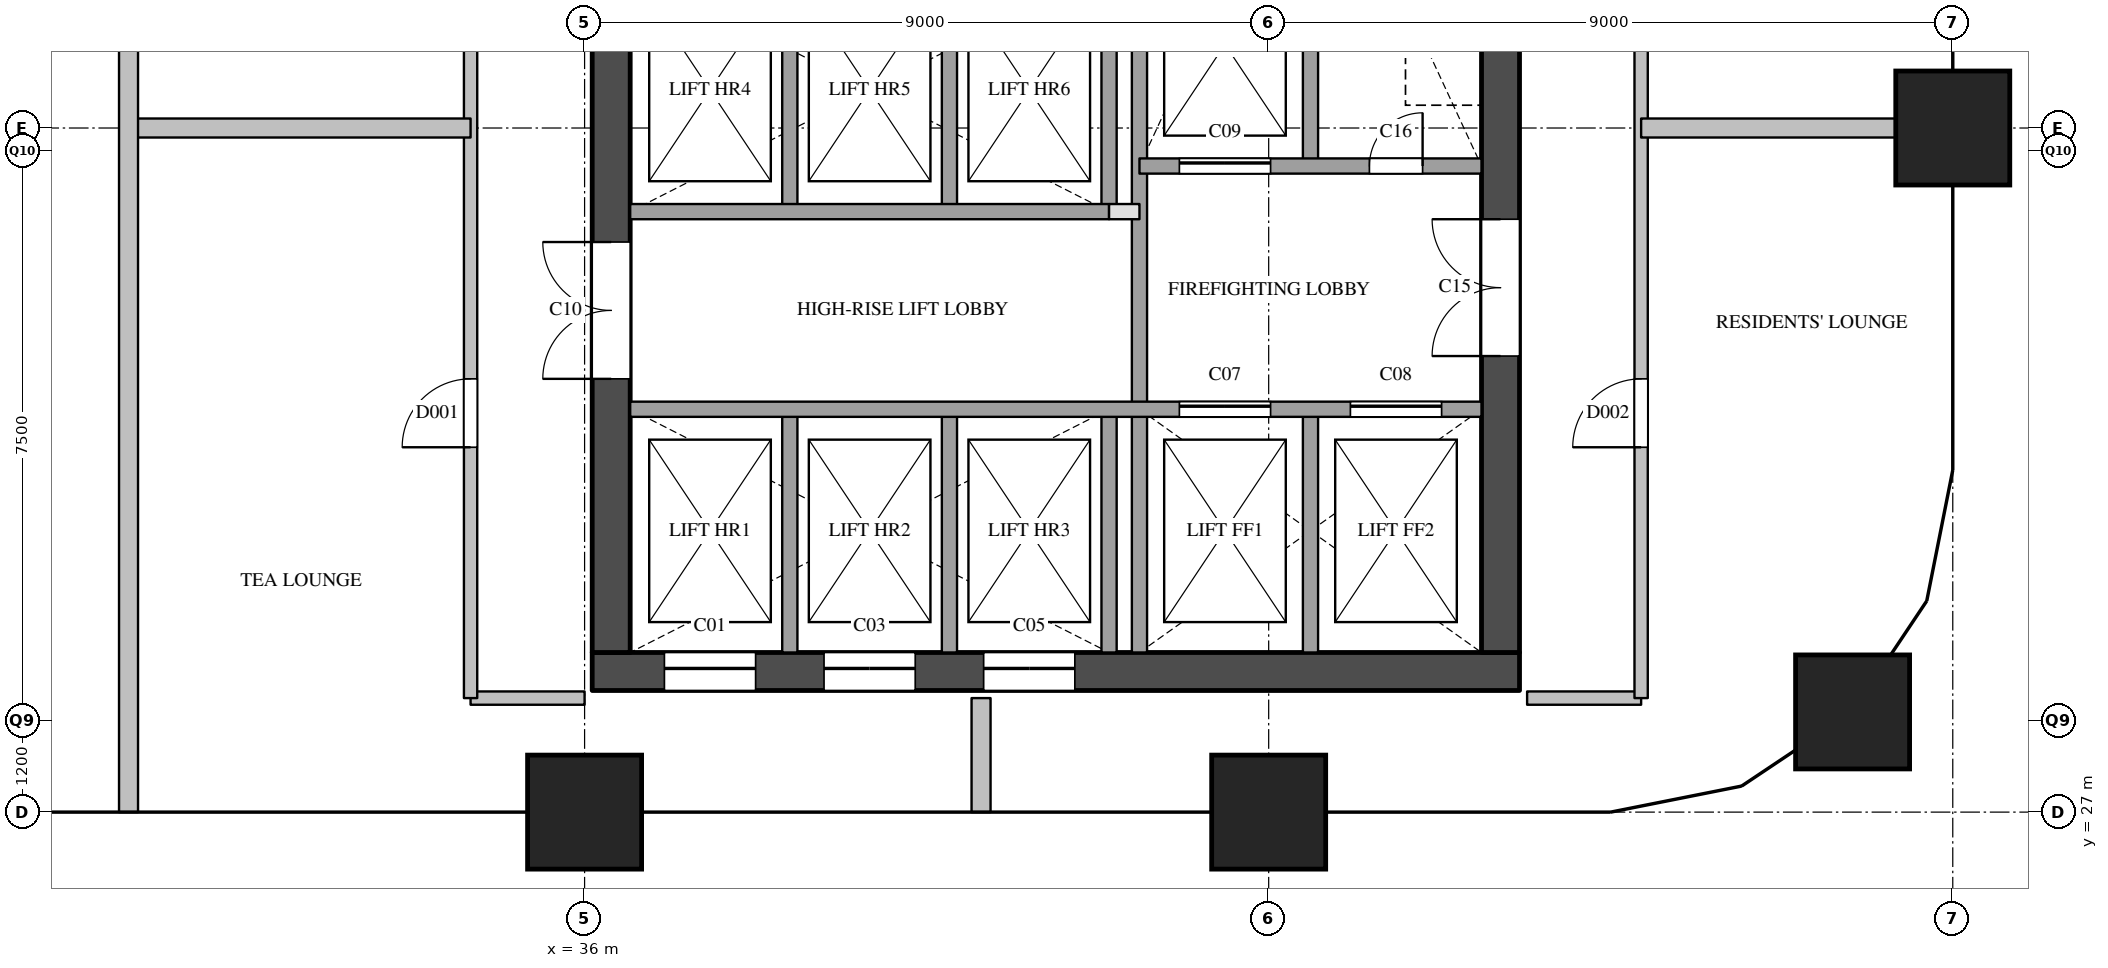
"""IFC4 building model, lengths in metres.
Left out: names, types, materials, properties, quantities, classifications, styles, units other than length and angle.
Written with IfcOpenShell. Run it as: python <this file> out.ifc"""

import sys

from ifc_helpers import new_model, si_unit, direction, frame, frame_2d, origin, origin_2d, place, context, subcontext, project, spatial, rectangle, extrude, element, fill, save


model = new_model("IFC4")
c1 = context("Model", 3, precision=1e-05, world=origin(), true_north=direction((0.0, 1.0)))
c2 = subcontext(c1, "Body", "Model", "MODEL_VIEW")
j1 = project(units=[si_unit("LENGTHUNIT", "METRE"), si_unit("PLANEANGLEUNIT", "RADIAN")], contexts=[c1])
p1 = place(None, origin())
s1 = spatial("IfcSite", under=j1, at=p1, CompositionType="ELEMENT")
p2 = place(p1, origin())
s2 = spatial("IfcBuilding", under=s1, at=p2, CompositionType="ELEMENT")
p3 = place(p2, frame((0.0, 0.0, 154.4)))
s3 = spatial("IfcBuildingStorey", under=s2, at=p3, CompositionType="ELEMENT", Elevation=154.4)
for number, where, z_axis, x_axis in (
    (1, (36.0, 27.0, 0.0), (0.0, 0.0, 1.0), (1.0, 0.0, 0.0)),
    (2, (45.0, 27.0, 0.0), (0.0, 0.0, 1.0), (1.0, 0.0, 0.0)),
    (3, (52.682, 28.318, 0.0), (0.0, 0.0, 1.0), (1.0, 0.0, 0.0)),
    (4, (54.0, 36.0, 0.0), (0.0, 0.0, 1.0), (1.0, 0.0, 0.0)),
):
    element("IfcColumn", number, at=place(p3, frame(where, z_axis=z_axis, x_axis=x_axis)), inside=s3, PredefinedType="COLUMN", context=c2, shape_type="SweptSolid", body=[
        extrude(rectangle(XDim=1.5, YDim=1.5, at=origin_2d()), origin(), (0.0, 0.0, 1.0), 3.9),
    ])
p4 = place(p3, frame((36.1, 28.85, 0.0), z_axis=(0.0, 0.0, 1.0), x_axis=(1.0, 0.0, 0.0)))
e5 = element("IfcWall", 5, at=p4, inside=s3, PredefinedType="SHEAR", context=c2, shape_type="SweptSolid", body=[
    extrude(rectangle(XDim=12.2, YDim=0.5, at=frame_2d((6.1, 0.0))), origin(), (0.0, 0.0, 1.0), 3.6),
])
p5 = place(p4, frame((0.95, 0.0, 0.0)))
e6 = element("IfcOpeningElement", 6, at=p5, cuts=e5, PredefinedType="OPENING", context=c2, shape_type="SweptSolid", body=[
    extrude(rectangle(XDim=1.2, YDim=2.1, at=frame_2d((0.6, 1.05))), frame((0.0, 0.26, 0.0), z_axis=(0.0, -1.0, 0.0), x_axis=(1.0, 0.0, 0.0)), (0.0, 0.0, 1.0), 0.52),
])
p6 = place(p4, frame((3.05, 0.0, 0.0)))
e7 = element("IfcOpeningElement", 7, at=p6, cuts=e5, PredefinedType="OPENING", context=c2, shape_type="SweptSolid", body=[
    extrude(rectangle(XDim=1.2, YDim=2.1, at=frame_2d((0.6, 1.05))), frame((0.0, 0.26, 0.0), z_axis=(0.0, -1.0, 0.0), x_axis=(1.0, 0.0, 0.0)), (0.0, 0.0, 1.0), 0.52),
])
p7 = place(p4, frame((5.15, 0.0, 0.0)))
e8 = element("IfcOpeningElement", 8, at=p7, cuts=e5, PredefinedType="OPENING", context=c2, shape_type="SweptSolid", body=[
    extrude(rectangle(XDim=1.2, YDim=2.1, at=frame_2d((0.6, 1.05))), frame((0.0, 0.26, 0.0), z_axis=(0.0, -1.0, 0.0), x_axis=(1.0, 0.0, 0.0)), (0.0, 0.0, 1.0), 0.52),
])
p8 = place(p3, frame((36.35, 29.1, 0.0), z_axis=(0.0, 0.0, 1.0), x_axis=(0.0, 1.0, 0.0)))
e9 = element("IfcWall", 9, at=p8, inside=s3, PredefinedType="SHEAR", context=c2, shape_type="SweptSolid", body=[
    extrude(rectangle(XDim=20.3, YDim=0.5, at=frame_2d((10.15, 0.0))), origin(), (0.0, 0.0, 1.0), 3.6),
])
p9 = place(p8, frame((3.6, 0.0, 0.0)))
e10 = element("IfcOpeningElement", 10, at=p9, cuts=e9, PredefinedType="OPENING", context=c2, shape_type="SweptSolid", body=[
    extrude(rectangle(XDim=1.8, YDim=2.1, at=frame_2d((0.9, 1.05))), frame((0.0, 0.26, 0.0), z_axis=(0.0, -1.0, 0.0), x_axis=(1.0, 0.0, 0.0)), (0.0, 0.0, 1.0), 0.52),
])
p10 = place(p8, frame((16.4, 0.0, 0.0)))
e11 = element("IfcOpeningElement", 11, at=p10, cuts=e9, PredefinedType="OPENING", context=c2, shape_type="SweptSolid", body=[
    extrude(rectangle(XDim=1.0, YDim=2.1, at=frame_2d((0.5, 1.05))), frame((0.0, 0.26, 0.0), z_axis=(0.0, -1.0, 0.0), x_axis=(1.0, 0.0, 0.0)), (0.0, 0.0, 1.0), 0.52),
])
p11 = place(p3, frame((48.05, 29.1, 0.0), z_axis=(0.0, 0.0, 1.0), x_axis=(0.0, 1.0, 0.0)))
e12 = element("IfcWall", 12, at=p11, inside=s3, PredefinedType="SHEAR", context=c2, shape_type="SweptSolid", body=[
    extrude(rectangle(XDim=20.3, YDim=0.5, at=frame_2d((10.15, 0.0))), origin(), (0.0, 0.0, 1.0), 3.6),
])
p12 = place(p11, frame((12.5, 0.0, 0.0)))
e13 = element("IfcOpeningElement", 13, at=p12, cuts=e12, PredefinedType="OPENING", context=c2, shape_type="SweptSolid", body=[
    extrude(rectangle(XDim=0.7, YDim=2.1, at=frame_2d((0.35, 1.05))), frame((0.0, 0.26, 0.0), z_axis=(0.0, -1.0, 0.0), x_axis=(1.0, 0.0, 0.0)), (0.0, 0.0, 1.0), 0.52),
])
p13 = place(p11, frame((3.9, 0.0, 0.0)))
e14 = element("IfcOpeningElement", 14, at=p13, cuts=e12, PredefinedType="OPENING", context=c2, shape_type="SweptSolid", body=[
    extrude(rectangle(XDim=1.8, YDim=2.1, at=frame_2d((0.9, 1.05))), frame((0.0, 0.26, 0.0), z_axis=(0.0, -1.0, 0.0), x_axis=(1.0, 0.0, 0.0)), (0.0, 0.0, 1.0), 0.52),
])
p14 = place(p3, frame((38.7, 29.1, 0.0), z_axis=(0.0, 0.0, 1.0), x_axis=(0.0, 1.0, 0.0)))
e15 = element("IfcWall", 15, at=p14, inside=s3, PredefinedType="SOLIDWALL", context=c2, shape_type="SweptSolid", body=[
    extrude(rectangle(XDim=3.2, YDim=0.2, at=frame_2d((1.6, 0.0))), origin(), (0.0, 0.0, 1.0), 3.6),
])
p15 = place(p3, frame((38.7, 34.9, 0.0), z_axis=(0.0, 0.0, 1.0), x_axis=(0.0, 1.0, 0.0)))
e16 = element("IfcWall", 16, at=p15, inside=s3, PredefinedType="SOLIDWALL", context=c2, shape_type="SweptSolid", body=[
    extrude(rectangle(XDim=3.2, YDim=0.2, at=frame_2d((1.6, 0.0))), origin(), (0.0, 0.0, 1.0), 3.6),
])
p16 = place(p3, frame((40.8, 29.1, 0.0), z_axis=(0.0, 0.0, 1.0), x_axis=(0.0, 1.0, 0.0)))
e17 = element("IfcWall", 17, at=p16, inside=s3, PredefinedType="SOLIDWALL", context=c2, shape_type="SweptSolid", body=[
    extrude(rectangle(XDim=3.2, YDim=0.2, at=frame_2d((1.6, 0.0))), origin(), (0.0, 0.0, 1.0), 3.6),
])
p17 = place(p3, frame((40.8, 34.9, 0.0), z_axis=(0.0, 0.0, 1.0), x_axis=(0.0, 1.0, 0.0)))
e18 = element("IfcWall", 18, at=p17, inside=s3, PredefinedType="SOLIDWALL", context=c2, shape_type="SweptSolid", body=[
    extrude(rectangle(XDim=3.2, YDim=0.2, at=frame_2d((1.6, 0.0))), origin(), (0.0, 0.0, 1.0), 3.6),
])
p18 = place(p3, frame((42.9, 29.1, 0.0), z_axis=(0.0, 0.0, 1.0), x_axis=(0.0, 1.0, 0.0)))
e19 = element("IfcWall", 19, at=p18, inside=s3, PredefinedType="SOLIDWALL", context=c2, shape_type="SweptSolid", body=[
    extrude(rectangle(XDim=3.2, YDim=0.2, at=frame_2d((1.6, 0.0))), origin(), (0.0, 0.0, 1.0), 3.6),
])
p19 = place(p3, frame((42.9, 34.9, 0.0), z_axis=(0.0, 0.0, 1.0), x_axis=(0.0, 1.0, 0.0)))
e20 = element("IfcWall", 20, at=p19, inside=s3, PredefinedType="SOLIDWALL", context=c2, shape_type="SweptSolid", body=[
    extrude(rectangle(XDim=3.2, YDim=0.2, at=frame_2d((1.6, 0.0))), origin(), (0.0, 0.0, 1.0), 3.6),
])
p20 = place(p3, frame((43.3, 29.1, 0.0), z_axis=(0.0, 0.0, 1.0), x_axis=(0.0, 1.0, 0.0)))
e21 = element("IfcWall", 21, at=p20, inside=s3, PredefinedType="SOLIDWALL", context=c2, shape_type="SweptSolid", body=[
    extrude(rectangle(XDim=9.9, YDim=0.2, at=frame_2d((4.95, 0.0))), origin(), (0.0, 0.0, 1.0), 3.6),
])
for number, where, z_axis, x_axis in (
    (22, (45.55, 29.1, 0.0), (0.0, 0.0, 1.0), (0.0, 1.0, 0.0)),
    (23, (45.55, 35.5, 0.0), (0.0, 0.0, 1.0), (0.0, 1.0, 0.0)),
):
    element("IfcWall", number, at=place(p3, frame(where, z_axis=z_axis, x_axis=x_axis)), inside=s3, PredefinedType="SOLIDWALL", context=c2, shape_type="SweptSolid", body=[
        extrude(rectangle(XDim=3.2, YDim=0.2, at=frame_2d((1.6, 0.0))), origin(), (0.0, 0.0, 1.0), 3.6),
    ])
p21 = place(p3, frame((36.6, 32.3, 0.0), z_axis=(0.0, 0.0, 1.0), x_axis=(1.0, 0.0, 0.0)))
e24 = element("IfcWall", 24, at=p21, inside=s3, PredefinedType="SOLIDWALL", context=c2, shape_type="SweptSolid", body=[
    extrude(rectangle(XDim=11.2, YDim=0.2, at=frame_2d((5.6, 0.0))), origin(), (0.0, 0.0, 1.0), 3.6),
])
p22 = place(p21, frame((7.225, 0.0, 0.0)))
e25 = element("IfcOpeningElement", 25, at=p22, cuts=e24, PredefinedType="OPENING", context=c2, shape_type="SweptSolid", body=[
    extrude(rectangle(XDim=1.2, YDim=2.1, at=frame_2d((0.6, 1.05))), frame((0.0, 0.11, 0.0), z_axis=(0.0, -1.0, 0.0), x_axis=(1.0, 0.0, 0.0)), (0.0, 0.0, 1.0), 0.22),
])
p23 = place(p21, frame((9.475, 0.0, 0.0)))
e26 = element("IfcOpeningElement", 26, at=p23, cuts=e24, PredefinedType="OPENING", context=c2, shape_type="SweptSolid", body=[
    extrude(rectangle(XDim=1.2, YDim=2.1, at=frame_2d((0.6, 1.05))), frame((0.0, 0.11, 0.0), z_axis=(0.0, -1.0, 0.0), x_axis=(1.0, 0.0, 0.0)), (0.0, 0.0, 1.0), 0.22),
])
p24 = place(p3, frame((42.9, 34.9, 0.0), z_axis=(0.0, 0.0, 1.0), x_axis=(1.0, 0.0, 0.0)))
e27 = element("IfcWall", 27, at=p24, inside=s3, PredefinedType="PARTITIONING", context=c2, shape_type="SweptSolid", body=[
    extrude(rectangle(XDim=0.4, YDim=0.2, at=frame_2d((0.2, 0.0))), origin(), (0.0, 0.0, 1.0), 3.6),
])
p25 = place(p3, frame((36.6, 34.9, 0.0), z_axis=(0.0, 0.0, 1.0), x_axis=(1.0, 0.0, 0.0)))
e28 = element("IfcWall", 28, at=p25, inside=s3, PredefinedType="SOLIDWALL", context=c2, shape_type="SweptSolid", body=[
    extrude(rectangle(XDim=6.3, YDim=0.2, at=frame_2d((3.15, 0.0))), origin(), (0.0, 0.0, 1.0), 3.6),
])
p26 = place(p3, frame((43.3, 35.5, 0.0), z_axis=(0.0, 0.0, 1.0), x_axis=(1.0, 0.0, 0.0)))
e29 = element("IfcWall", 29, at=p26, inside=s3, PredefinedType="SOLIDWALL", context=c2, shape_type="SweptSolid", body=[
    extrude(rectangle(XDim=4.5, YDim=0.2, at=frame_2d((2.25, 0.0))), origin(), (0.0, 0.0, 1.0), 3.6),
])
p27 = place(p26, frame((0.525, 0.0, 0.0)))
e30 = element("IfcOpeningElement", 30, at=p27, cuts=e29, PredefinedType="OPENING", context=c2, shape_type="SweptSolid", body=[
    extrude(rectangle(XDim=1.2, YDim=2.1, at=frame_2d((0.6, 1.05))), frame((0.0, 0.11, 0.0), z_axis=(0.0, -1.0, 0.0), x_axis=(1.0, 0.0, 0.0)), (0.0, 0.0, 1.0), 0.22),
])
p28 = place(p26, frame((3.025, 0.0, 0.0)))
e31 = element("IfcOpeningElement", 31, at=p28, cuts=e29, PredefinedType="OPENING", context=c2, shape_type="SweptSolid", body=[
    extrude(rectangle(XDim=0.7, YDim=2.1, at=frame_2d((0.35, 1.05))), frame((0.0, 0.11, 0.0), z_axis=(0.0, -1.0, 0.0), x_axis=(1.0, 0.0, 0.0)), (0.0, 0.0, 1.0), 0.22),
])
for number, where, z_axis, x_axis in (
    (32, (34.5, 28.5, 0.0), (0.0, 0.0, 1.0), (1.0, 0.0, 0.0)),
    (33, (48.4, 28.5, 0.0), (0.0, 0.0, 1.0), (1.0, 0.0, 0.0)),
):
    element("IfcWall", number, at=place(p3, frame(where, z_axis=z_axis, x_axis=x_axis)), inside=s3, PredefinedType="PARTITIONING", context=c2, shape_type="SweptSolid", body=[
        extrude(rectangle(XDim=1.5, YDim=0.175, at=frame_2d((0.75, 0.0))), origin(), (0.0, 0.0, 1.0), 3.6),
    ])
p29 = place(p3, frame((34.5, 28.5, 0.0), z_axis=(0.0, 0.0, 1.0), x_axis=(0.0, 1.0, 0.0)))
e34 = element("IfcWall", 34, at=p29, inside=s3, PredefinedType="PARTITIONING", context=c2, shape_type="SweptSolid", body=[
    extrude(rectangle(XDim=12.75, YDim=0.175, at=frame_2d((6.375, 0.0))), origin(), (0.0, 0.0, 1.0), 3.6),
])
p30 = place(p29, frame((3.3, 0.0, 0.0)))
e35 = element("IfcOpeningElement", 35, at=p30, cuts=e34, PredefinedType="OPENING", context=c2, shape_type="SweptSolid", body=[
    extrude(rectangle(XDim=0.9, YDim=2.1, at=frame_2d((0.45, 1.05))), frame((0.0, 0.097, 0.0), z_axis=(0.0, -1.0, 0.0), x_axis=(1.0, 0.0, 0.0)), (0.0, 0.0, 1.0), 0.195),
])
p31 = place(p29, frame((9.625, 0.0, 0.0)))
e36 = element("IfcOpeningElement", 36, at=p31, cuts=e34, PredefinedType="OPENING", context=c2, shape_type="SweptSolid", body=[
    extrude(rectangle(XDim=1.0, YDim=2.1, at=frame_2d((0.5, 1.05))), frame((0.0, 0.097, 0.0), z_axis=(0.0, -1.0, 0.0), x_axis=(1.0, 0.0, 0.0)), (0.0, 0.0, 1.0), 0.195),
])
p32 = place(p3, frame((49.9, 28.5, 0.0), z_axis=(0.0, 0.0, 1.0), x_axis=(0.0, 1.0, 0.0)))
e37 = element("IfcWall", 37, at=p32, inside=s3, PredefinedType="PARTITIONING", context=c2, shape_type="SweptSolid", body=[
    extrude(rectangle(XDim=23.0, YDim=0.175, at=frame_2d((11.5, 0.0))), origin(), (0.0, 0.0, 1.0), 3.6),
])
p33 = place(p32, frame((3.3, 0.0, 0.0)))
e38 = element("IfcOpeningElement", 38, at=p33, cuts=e37, PredefinedType="OPENING", context=c2, shape_type="SweptSolid", body=[
    extrude(rectangle(XDim=0.9, YDim=2.1, at=frame_2d((0.45, 1.05))), frame((0.0, 0.097, 0.0), z_axis=(0.0, -1.0, 0.0), x_axis=(1.0, 0.0, 0.0)), (0.0, 0.0, 1.0), 0.195),
])
p34 = place(p32, frame((14.8, 0.0, 0.0)))
e39 = element("IfcOpeningElement", 39, at=p34, cuts=e37, PredefinedType="OPENING", context=c2, shape_type="SweptSolid", body=[
    extrude(rectangle(XDim=0.9, YDim=2.1, at=frame_2d((0.45, 1.05))), frame((0.0, 0.097, 0.0), z_axis=(0.0, -1.0, 0.0), x_axis=(1.0, 0.0, 0.0)), (0.0, 0.0, 1.0), 0.195),
])
p35 = place(p3, frame((30.0, 36.0, 0.0), z_axis=(0.0, 0.0, 1.0), x_axis=(1.0, 0.0, 0.0)))
e40 = element("IfcWall", 40, at=p35, inside=s3, PredefinedType="PARTITIONING", context=c2, shape_type="SweptSolid", body=[
    extrude(rectangle(XDim=4.5, YDim=0.25, at=frame_2d((2.25, 0.0))), origin(), (0.0, 0.0, 1.0), 3.6),
])
p36 = place(p3, frame((49.9, 36.0, 0.0), z_axis=(0.0, 0.0, 1.0), x_axis=(1.0, 0.0, 0.0)))
e41 = element("IfcWall", 41, at=p36, inside=s3, PredefinedType="PARTITIONING", context=c2, shape_type="SweptSolid", body=[
    extrude(rectangle(XDim=4.1, YDim=0.25, at=frame_2d((2.05, 0.0))), origin(), (0.0, 0.0, 1.0), 3.6),
])
p37 = place(p3, frame((30.0, 27.0, 0.0), z_axis=(0.0, 0.0, 1.0), x_axis=(0.0, 1.0, 0.0)))
e42 = element("IfcWall", 42, at=p37, inside=s3, PredefinedType="PARTITIONING", context=c2, shape_type="SweptSolid", body=[
    extrude(rectangle(XDim=14.25, YDim=0.25, at=frame_2d((7.125, 0.0))), origin(), (0.0, 0.0, 1.0), 2.6),
])
p38 = place(p3, frame((41.216, 27.0, 0.0), z_axis=(0.0, 0.0, 1.0), x_axis=(0.0, 1.0, 0.0)))
e43 = element("IfcWall", 43, at=p38, inside=s3, PredefinedType="PARTITIONING", context=c2, shape_type="SweptSolid", body=[
    extrude(rectangle(XDim=1.5, YDim=0.25, at=frame_2d((0.75, 0.0))), origin(), (0.0, 0.0, 1.0), 2.6),
])
p39 = place(p5, origin())
e44 = element("IfcDoor", 44, at=p39, inside=s3, OperationType="SLIDING_TO_LEFT", PredefinedType="DOOR", context=c2, shape_type="SweptSolid", body=[
    extrude(rectangle(XDim=1.2, YDim=2.1, at=frame_2d((0.6, 1.05))), frame((0.0, 0.025, 0.0), z_axis=(0.0, -1.0, 0.0), x_axis=(1.0, 0.0, 0.0)), (0.0, 0.0, 1.0), 0.05),
])
fill(e6, e44)
p40 = place(p6, origin())
e45 = element("IfcDoor", 45, at=p40, inside=s3, OperationType="SLIDING_TO_LEFT", PredefinedType="DOOR", context=c2, shape_type="SweptSolid", body=[
    extrude(rectangle(XDim=1.2, YDim=2.1, at=frame_2d((0.6, 1.05))), frame((0.0, 0.025, 0.0), z_axis=(0.0, -1.0, 0.0), x_axis=(1.0, 0.0, 0.0)), (0.0, 0.0, 1.0), 0.05),
])
fill(e7, e45)
p41 = place(p7, origin())
e46 = element("IfcDoor", 46, at=p41, inside=s3, OperationType="SLIDING_TO_LEFT", PredefinedType="DOOR", context=c2, shape_type="SweptSolid", body=[
    extrude(rectangle(XDim=1.2, YDim=2.1, at=frame_2d((0.6, 1.05))), frame((0.0, 0.025, 0.0), z_axis=(0.0, -1.0, 0.0), x_axis=(1.0, 0.0, 0.0)), (0.0, 0.0, 1.0), 0.05),
])
fill(e8, e46)
p42 = place(p22, origin())
e47 = element("IfcDoor", 47, at=p42, inside=s3, OperationType="SLIDING_TO_LEFT", PredefinedType="DOOR", context=c2, shape_type="SweptSolid", body=[
    extrude(rectangle(XDim=1.2, YDim=2.1, at=frame_2d((0.6, 1.05))), frame((0.0, 0.025, 0.0), z_axis=(0.0, -1.0, 0.0), x_axis=(1.0, 0.0, 0.0)), (0.0, 0.0, 1.0), 0.05),
])
fill(e25, e47)
p43 = place(p23, origin())
e48 = element("IfcDoor", 48, at=p43, inside=s3, OperationType="SLIDING_TO_LEFT", PredefinedType="DOOR", context=c2, shape_type="SweptSolid", body=[
    extrude(rectangle(XDim=1.2, YDim=2.1, at=frame_2d((0.6, 1.05))), frame((0.0, 0.025, 0.0), z_axis=(0.0, -1.0, 0.0), x_axis=(1.0, 0.0, 0.0)), (0.0, 0.0, 1.0), 0.05),
])
fill(e26, e48)
p44 = place(p27, origin())
e49 = element("IfcDoor", 49, at=p44, inside=s3, OperationType="SLIDING_TO_LEFT", PredefinedType="DOOR", context=c2, shape_type="SweptSolid", body=[
    extrude(rectangle(XDim=1.2, YDim=2.1, at=frame_2d((0.6, 1.05))), frame((0.0, 0.025, 0.0), z_axis=(0.0, -1.0, 0.0), x_axis=(1.0, 0.0, 0.0)), (0.0, 0.0, 1.0), 0.05),
])
fill(e30, e49)
p45 = place(p9, origin())
e50 = element("IfcDoor", 50, at=p45, inside=s3, OperationType="DOUBLE_DOOR_SINGLE_SWING", PredefinedType="DOOR", context=c2, shape_type="SweptSolid", body=[
    extrude(rectangle(XDim=1.8, YDim=2.1, at=frame_2d((0.9, 1.05))), frame((0.0, 0.025, 0.0), z_axis=(0.0, -1.0, 0.0), x_axis=(1.0, 0.0, 0.0)), (0.0, 0.0, 1.0), 0.05),
])
fill(e10, e50)
p46 = place(p13, origin())
e51 = element("IfcDoor", 51, at=p46, inside=s3, OperationType="DOUBLE_DOOR_SINGLE_SWING", PredefinedType="DOOR", context=c2, shape_type="SweptSolid", body=[
    extrude(rectangle(XDim=1.8, YDim=2.1, at=frame_2d((0.9, 1.05))), frame((0.0, 0.025, 0.0), z_axis=(0.0, -1.0, 0.0), x_axis=(1.0, 0.0, 0.0)), (0.0, 0.0, 1.0), 0.05),
])
fill(e14, e51)
p47 = place(p28, origin())
e52 = element("IfcDoor", 52, at=p47, inside=s3, OperationType="SINGLE_SWING_RIGHT", PredefinedType="DOOR", context=c2, shape_type="SweptSolid", body=[
    extrude(rectangle(XDim=0.7, YDim=2.1, at=frame_2d((0.35, 1.05))), frame((0.0, 0.025, 0.0), z_axis=(0.0, -1.0, 0.0), x_axis=(1.0, 0.0, 0.0)), (0.0, 0.0, 1.0), 0.05),
])
fill(e31, e52)
p48 = place(p30, origin())
e53 = element("IfcDoor", 53, at=p48, inside=s3, OperationType="SINGLE_SWING_LEFT", PredefinedType="DOOR", context=c2, shape_type="SweptSolid", body=[
    extrude(rectangle(XDim=0.9, YDim=2.1, at=frame_2d((0.45, 1.05))), frame((0.0, 0.025, 0.0), z_axis=(0.0, -1.0, 0.0), x_axis=(1.0, 0.0, 0.0)), (0.0, 0.0, 1.0), 0.05),
])
fill(e35, e53)
p49 = place(p33, origin())
e54 = element("IfcDoor", 54, at=p49, inside=s3, OperationType="SINGLE_SWING_LEFT", PredefinedType="DOOR", context=c2, shape_type="SweptSolid", body=[
    extrude(rectangle(XDim=0.9, YDim=2.1, at=frame_2d((0.45, 1.05))), frame((0.0, 0.025, 0.0), z_axis=(0.0, -1.0, 0.0), x_axis=(1.0, 0.0, 0.0)), (0.0, 0.0, 1.0), 0.05),
])
fill(e38, e54)
save(model, sys.argv[1])
